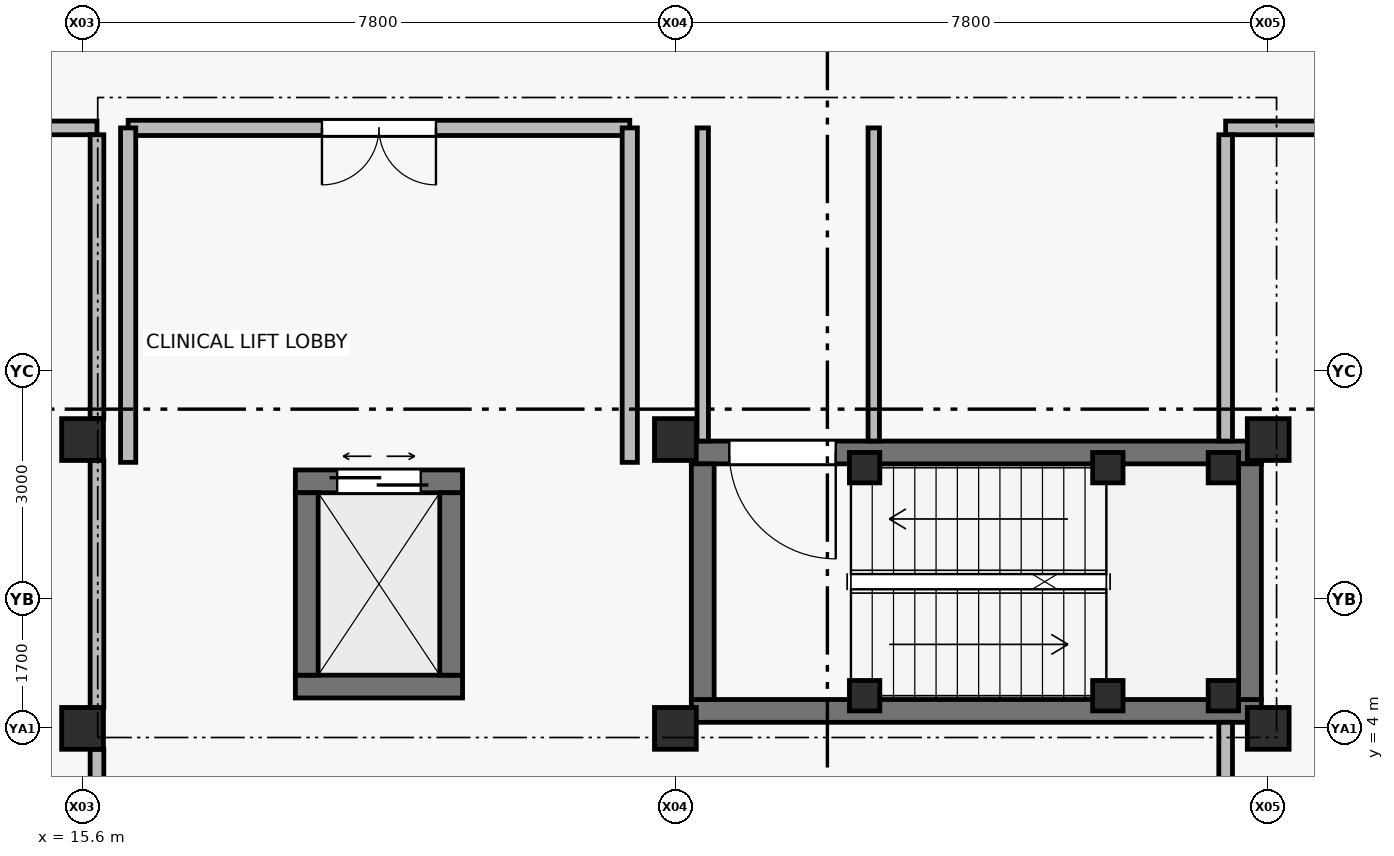
"""IFC4 building model, lengths in metres.
Left out: names, types, materials, properties, quantities, classifications, styles, units other than length and angle.
Written with IfcOpenShell. Run it as: python <this file> out.ifc"""

import sys

from ifc_helpers import new_model, si_unit, direction, frame, frame_2d, origin, origin_2d, place, context, subcontext, project, spatial, rectangle, extrude, element, fill, save


model = new_model("IFC4")
c1 = context("Model", 3, precision=1e-05, world=origin(), true_north=direction((0.0, 1.0)))
c2 = subcontext(c1, "Body", "Model", "MODEL_VIEW")
j1 = project(units=[si_unit("LENGTHUNIT", "METRE"), si_unit("PLANEANGLEUNIT", "RADIAN")], contexts=[c1])
p1 = place(None, origin())
s1 = spatial("IfcSite", under=j1, at=p1, CompositionType="ELEMENT")
p2 = place(p1, origin())
s2 = spatial("IfcBuilding", under=s1, at=p2, CompositionType="ELEMENT")
p3 = place(p2, frame((0.0, 0.0, 9.6)))
s3 = spatial("IfcBuildingStorey", under=s2, at=p3, CompositionType="ELEMENT", Elevation=9.6)
for number, where, z_axis, x_axis in (
    (1, (15.6, 4.0, 0.0), (0.0, 0.0, 1.0), (1.0, 0.0, 0.0)),
    (2, (15.6, 7.8, 0.0), (0.0, 0.0, 1.0), (1.0, 0.0, 0.0)),
    (3, (23.4, 4.0, 0.0), (0.0, 0.0, 1.0), (1.0, 0.0, 0.0)),
    (4, (23.4, 7.8, 0.0), (0.0, 0.0, 1.0), (1.0, 0.0, 0.0)),
    (5, (31.2, 4.0, 0.0), (0.0, 0.0, 1.0), (1.0, 0.0, 0.0)),
    (6, (31.2, 7.8, 0.0), (0.0, 0.0, 1.0), (1.0, 0.0, 0.0)),
):
    element("IfcColumn", number, at=place(p3, frame(where, z_axis=z_axis, x_axis=x_axis)), inside=s3, PredefinedType="COLUMN", context=c2, shape_type="SweptSolid", body=[
        extrude(rectangle(XDim=0.55, YDim=0.55, at=origin_2d()), origin(), (0.0, 0.0, 1.0), 4.5),
    ])
for number, where, z_axis, x_axis in (
    (7, (25.89, 4.43, 0.0), (0.0, 0.0, 1.0), (1.0, 0.0, 0.0)),
    (8, (25.89, 7.43, 0.0), (0.0, 0.0, 1.0), (1.0, 0.0, 0.0)),
    (9, (29.09, 4.43, 0.0), (0.0, 0.0, 1.0), (1.0, 0.0, 0.0)),
    (10, (29.09, 7.43, 0.0), (0.0, 0.0, 1.0), (1.0, 0.0, 0.0)),
    (11, (30.61, 4.43, 0.0), (0.0, 0.0, 1.0), (1.0, 0.0, 0.0)),
    (12, (30.61, 7.43, 0.0), (0.0, 0.0, 1.0), (1.0, 0.0, 0.0)),
):
    element("IfcColumn", number, at=place(p3, frame(where, z_axis=z_axis, x_axis=x_axis)), inside=s3, PredefinedType="COLUMN", context=c2, shape_type="SweptSolid", body=[
        extrude(rectangle(XDim=0.4, YDim=0.4, at=origin_2d()), origin(), (0.0, 0.0, 1.0), 4.5),
    ])
p4 = place(p3, frame((23.61, 4.23, 0.0), z_axis=(0.0, 0.0, 1.0), x_axis=(1.0, 0.0, 0.0)))
e13 = element("IfcWall", 13, at=p4, inside=s3, PredefinedType="SHEAR", context=c2, shape_type="SweptSolid", body=[
    extrude(rectangle(XDim=7.5, YDim=0.3, at=frame_2d((3.75, 0.0))), origin(), (0.0, 0.0, 1.0), 4.24),
])
p5 = place(p3, frame((31.11, 7.63, 0.0), z_axis=(0.0, 0.0, 1.0), x_axis=(-1.0, 0.0, 0.0)))
e14 = element("IfcWall", 14, at=p5, inside=s3, PredefinedType="SHEAR", context=c2, shape_type="SweptSolid", body=[
    extrude(rectangle(XDim=7.5, YDim=0.3, at=frame_2d((3.75, 0.0))), origin(), (0.0, 0.0, 1.0), 4.24),
])
p6 = place(p5, frame((5.6, 0.0, 0.0)))
e15 = element("IfcOpeningElement", 15, at=p6, cuts=e14, PredefinedType="OPENING", context=c2, shape_type="SweptSolid", body=[
    extrude(rectangle(XDim=1.4, YDim=2.2, at=frame_2d((0.7, 1.1))), frame((0.0, 0.16, 0.0), z_axis=(0.0, -1.0, 0.0), x_axis=(1.0, 0.0, 0.0)), (0.0, 0.0, 1.0), 0.32),
])
for number, where, z_axis, x_axis in (
    (16, (23.76, 7.48, 0.0), (0.0, 0.0, 1.0), (0.0, -1.0, 0.0)),
    (17, (30.96, 4.38, 0.0), (0.0, 0.0, 1.0), (0.0, 1.0, 0.0)),
):
    element("IfcWall", number, at=place(p3, frame(where, z_axis=z_axis, x_axis=x_axis)), inside=s3, PredefinedType="SHEAR", context=c2, shape_type="SweptSolid", body=[
        extrude(rectangle(XDim=3.1, YDim=0.3, at=frame_2d((1.55, 0.0))), origin(), (0.0, 0.0, 1.0), 4.24),
    ])
p7 = place(p3, frame((18.4, 4.55, 0.0), z_axis=(0.0, 0.0, 1.0), x_axis=(1.0, 0.0, 0.0)))
e18 = element("IfcWall", 18, at=p7, inside=s3, PredefinedType="SHEAR", context=c2, shape_type="SweptSolid", body=[
    extrude(rectangle(XDim=2.2, YDim=0.3, at=frame_2d((1.1, 0.0))), origin(), (0.0, 0.0, 1.0), 4.24),
])
p8 = place(p3, frame((20.6, 7.25, 0.0), z_axis=(0.0, 0.0, 1.0), x_axis=(-1.0, 0.0, 0.0)))
e19 = element("IfcWall", 19, at=p8, inside=s3, PredefinedType="SHEAR", context=c2, shape_type="SweptSolid", body=[
    extrude(rectangle(XDim=2.2, YDim=0.3, at=frame_2d((1.1, 0.0))), origin(), (0.0, 0.0, 1.0), 4.24),
])
p9 = place(p8, frame((0.55, 0.0, 0.0)))
e20 = element("IfcOpeningElement", 20, at=p9, cuts=e19, PredefinedType="OPENING", context=c2, shape_type="SweptSolid", body=[
    extrude(rectangle(XDim=1.1, YDim=2.2, at=frame_2d((0.55, 1.1))), frame((0.0, 0.16, 0.0), z_axis=(0.0, -1.0, 0.0), x_axis=(1.0, 0.0, 0.0)), (0.0, 0.0, 1.0), 0.32),
])
for number, where, z_axis, x_axis in (
    (21, (18.55, 7.1, 0.0), (0.0, 0.0, 1.0), (0.0, -1.0, 0.0)),
    (22, (20.45, 4.7, 0.0), (0.0, 0.0, 1.0), (0.0, 1.0, 0.0)),
):
    element("IfcWall", number, at=place(p3, frame(where, z_axis=z_axis, x_axis=x_axis)), inside=s3, PredefinedType="SHEAR", context=c2, shape_type="SweptSolid", body=[
        extrude(rectangle(XDim=2.4, YDim=0.3, at=frame_2d((1.2, 0.0))), origin(), (0.0, 0.0, 1.0), 4.24),
    ])
p10 = place(p3, frame((22.8, 11.9, 0.0), z_axis=(0.0, 0.0, 1.0), x_axis=(-1.0, 0.0, 0.0)))
e23 = element("IfcWall", 23, at=p10, inside=s3, PredefinedType="SOLIDWALL", context=c2, shape_type="SweptSolid", body=[
    extrude(rectangle(XDim=6.6, YDim=0.2, at=frame_2d((3.3, 0.0))), origin(), (0.0, 0.0, 1.0), 4.24),
])
p11 = place(p10, frame((2.55, 0.0, 0.0)))
e24 = element("IfcOpeningElement", 24, at=p11, cuts=e23, PredefinedType="OPENING", context=c2, shape_type="SweptSolid", body=[
    extrude(rectangle(XDim=1.5, YDim=2.2, at=frame_2d((0.75, 1.1))), frame((0.0, 0.11, 0.0), z_axis=(0.0, -1.0, 0.0), x_axis=(1.0, 0.0, 0.0)), (0.0, 0.0, 1.0), 0.22),
])
for number, where, z_axis, x_axis in (
    (25, (16.2, 11.9, 0.0), (0.0, 0.0, 1.0), (0.0, -1.0, 0.0)),
    (26, (22.8, 7.5, 0.0), (0.0, 0.0, 1.0), (0.0, 1.0, 0.0)),
):
    element("IfcWall", number, at=place(p3, frame(where, z_axis=z_axis, x_axis=x_axis)), inside=s3, PredefinedType="SOLIDWALL", context=c2, shape_type="SweptSolid", body=[
        extrude(rectangle(XDim=4.4, YDim=0.2, at=frame_2d((2.2, 0.0))), origin(), (0.0, 0.0, 1.0), 4.24),
    ])
p12 = place(p3, frame((23.76, 7.78, 0.0), z_axis=(0.0, 0.0, 1.0), x_axis=(0.0, 1.0, 0.0)))
e27 = element("IfcWall", 27, at=p12, inside=s3, PredefinedType="PARTITIONING", context=c2, shape_type="SweptSolid", body=[
    extrude(rectangle(XDim=4.12, YDim=0.15, at=frame_2d((2.06, 0.0))), origin(), (0.0, 0.0, 1.0), 3.79),
])
p13 = place(p3, frame((26.01, 7.78, 0.0), z_axis=(0.0, 0.0, 1.0), x_axis=(0.0, 1.0, 0.0)))
e28 = element("IfcWall", 28, at=p13, inside=s3, PredefinedType="PARTITIONING", context=c2, shape_type="SweptSolid", body=[
    extrude(rectangle(XDim=4.12, YDim=0.15, at=frame_2d((2.06, 0.0))), origin(), (0.0, 0.0, 1.0), 4.24),
])
p14 = place(p3, frame((15.79, 11.9, 0.0), z_axis=(0.0, 0.0, 1.0), x_axis=(-1.0, 0.0, 0.0)))
e29 = element("IfcWall", 29, at=p14, inside=s3, PredefinedType="PARTITIONING", context=c2, shape_type="SweptSolid", body=[
    extrude(rectangle(XDim=15.6, YDim=0.18, at=frame_2d((7.8, 0.0))), origin(), (0.0, 0.0, 1.0), 4.24),
])
p15 = place(p14, frame((6.85, 0.0, 0.0)))
e30 = element("IfcOpeningElement", 30, at=p15, cuts=e29, PredefinedType="OPENING", context=c2, shape_type="SweptSolid", body=[
    extrude(rectangle(XDim=1.9, YDim=2.3, at=frame_2d((0.95, 1.15))), frame((0.0, 0.1, 0.0), z_axis=(0.0, -1.0, 0.0), x_axis=(1.0, 0.0, 0.0)), (0.0, 0.0, 1.0), 0.2),
])
p16 = place(p3, frame((35.59, 11.9, 0.0), z_axis=(0.0, 0.0, 1.0), x_axis=(-1.0, 0.0, 0.0)))
e31 = element("IfcWall", 31, at=p16, inside=s3, PredefinedType="PARTITIONING", context=c2, shape_type="SweptSolid", body=[
    extrude(rectangle(XDim=4.95, YDim=0.18, at=frame_2d((2.475, 0.0))), origin(), (0.0, 0.0, 1.0), 4.24),
])
p17 = place(p16, frame((1.525, 0.0, 0.0)))
e32 = element("IfcOpeningElement", 32, at=p17, cuts=e31, PredefinedType="OPENING", context=c2, shape_type="SweptSolid", body=[
    extrude(rectangle(XDim=1.9, YDim=2.3, at=frame_2d((0.95, 1.15))), frame((0.0, 0.1, 0.0), z_axis=(0.0, -1.0, 0.0), x_axis=(1.0, 0.0, 0.0)), (0.0, 0.0, 1.0), 0.2),
])
p18 = place(p3, frame((15.79, 0.275, 0.0), z_axis=(0.0, 0.0, 1.0), x_axis=(0.0, 1.0, 0.0)))
e33 = element("IfcWall", 33, at=p18, inside=s3, PredefinedType="PARTITIONING", context=c2, shape_type="SweptSolid", body=[
    extrude(rectangle(XDim=3.45, YDim=0.18, at=frame_2d((1.725, 0.0))), origin(), (0.0, 0.0, 1.0), 3.79),
])
p19 = place(p3, frame((15.79, 4.275, 0.0), z_axis=(0.0, 0.0, 1.0), x_axis=(0.0, 1.0, 0.0)))
e34 = element("IfcWall", 34, at=p19, inside=s3, PredefinedType="PARTITIONING", context=c2, shape_type="SweptSolid", body=[
    extrude(rectangle(XDim=3.25, YDim=0.18, at=frame_2d((1.625, 0.0))), origin(), (0.0, 0.0, 1.0), 3.79),
])
p20 = place(p3, frame((15.79, 8.075, 0.0), z_axis=(0.0, 0.0, 1.0), x_axis=(0.0, 1.0, 0.0)))
e35 = element("IfcWall", 35, at=p20, inside=s3, PredefinedType="PARTITIONING", context=c2, shape_type="SweptSolid", body=[
    extrude(rectangle(XDim=3.735, YDim=0.18, at=frame_2d((1.868, 0.0))), origin(), (0.0, 0.0, 1.0), 3.79),
])
p21 = place(p3, frame((30.64, 0.19, 0.0), z_axis=(0.0, 0.0, 1.0), x_axis=(0.0, 1.0, 0.0)))
e36 = element("IfcWall", 36, at=p21, inside=s3, PredefinedType="PARTITIONING", context=c2, shape_type="SweptSolid", body=[
    extrude(rectangle(XDim=3.89, YDim=0.18, at=frame_2d((1.945, 0.0))), origin(), (0.0, 0.0, 1.0), 4.24),
])
p22 = place(p3, frame((30.64, 7.78, 0.0), z_axis=(0.0, 0.0, 1.0), x_axis=(0.0, 1.0, 0.0)))
e37 = element("IfcWall", 37, at=p22, inside=s3, PredefinedType="PARTITIONING", context=c2, shape_type="SweptSolid", body=[
    extrude(rectangle(XDim=4.03, YDim=0.18, at=frame_2d((2.015, 0.0))), origin(), (0.0, 0.0, 1.0), 4.24),
])
p23 = place(p6, origin())
e38 = element("IfcDoor", 38, at=p23, inside=s3, OperationType="SINGLE_SWING_LEFT", PredefinedType="DOOR", context=c2, shape_type="SweptSolid", body=[
    extrude(rectangle(XDim=1.4, YDim=2.2, at=frame_2d((0.7, 1.1))), frame((0.0, 0.025, 0.0), z_axis=(0.0, -1.0, 0.0), x_axis=(1.0, 0.0, 0.0)), (0.0, 0.0, 1.0), 0.05),
])
fill(e15, e38)
p24 = place(p9, origin())
e39 = element("IfcDoor", 39, at=p24, inside=s3, OperationType="DOUBLE_DOOR_SLIDING", PredefinedType="DOOR", context=c2, shape_type="SweptSolid", body=[
    extrude(rectangle(XDim=1.1, YDim=2.2, at=frame_2d((0.55, 1.1))), frame((0.0, 0.025, 0.0), z_axis=(0.0, -1.0, 0.0), x_axis=(1.0, 0.0, 0.0)), (0.0, 0.0, 1.0), 0.05),
])
fill(e20, e39)
p25 = place(p11, origin())
e40 = element("IfcDoor", 40, at=p25, inside=s3, OperationType="DOUBLE_DOOR_SINGLE_SWING", PredefinedType="DOOR", context=c2, shape_type="SweptSolid", body=[
    extrude(rectangle(XDim=1.5, YDim=2.2, at=frame_2d((0.75, 1.1))), frame((0.0, 0.025, 0.0), z_axis=(0.0, -1.0, 0.0), x_axis=(1.0, 0.0, 0.0)), (0.0, 0.0, 1.0), 0.05),
])
fill(e24, e40)
save(model, sys.argv[1])
